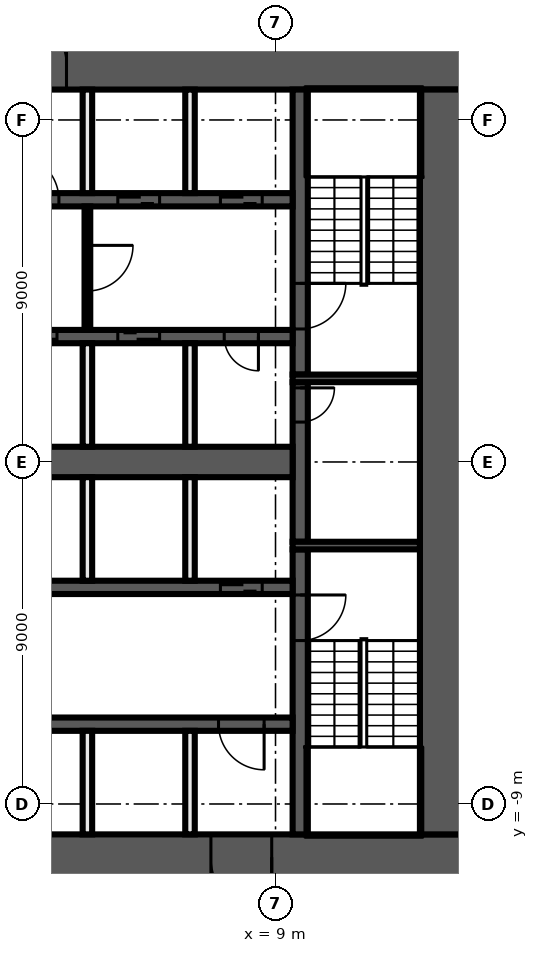
"""IFC4 building model, lengths in metres.
Left out: names, types, materials, properties, quantities, classifications, styles, units other than length and angle.
Written with IfcOpenShell. Run it as: python <this file> out.ifc"""

import sys

from ifc_helpers import new_model, si_unit, direction, frame, frame_2d, origin, place, context, subcontext, project, spatial, rectangle, extrude, element, fill, save


model = new_model("IFC4")
c1 = context("Model", 3, precision=1e-05, world=origin(), true_north=direction((0.0, 1.0)))
c2 = subcontext(c1, "Body", "Model", "MODEL_VIEW")
j1 = project(units=[si_unit("LENGTHUNIT", "METRE"), si_unit("PLANEANGLEUNIT", "RADIAN")], contexts=[c1])
p1 = place(None, origin())
s1 = spatial("IfcSite", under=j1, at=p1, CompositionType="ELEMENT")
p2 = place(p1, origin())
s2 = spatial("IfcBuilding", under=s1, at=p2, CompositionType="ELEMENT")
p3 = place(p2, frame((0.0, 0.0, 73.6)))
s3 = spatial("IfcBuildingStorey", under=s2, at=p3, CompositionType="ELEMENT", Elevation=73.6)
p4 = place(p3, frame((-14.0, 10.4, 0.0), z_axis=(0.0, 0.0, 1.0), x_axis=(1.0, 0.0, 0.0)))
e1 = element("IfcWall", 1, at=p4, inside=s3, PredefinedType="SHEAR", context=c2, shape_type="SweptSolid", body=[
    extrude(rectangle(XDim=28.0, YDim=1.2, at=frame_2d((14.0, 0.0))), origin(), (0.0, 0.0, 1.0), 3.3),
])
p5 = place(p4, frame((15.9, 0.0, 0.0)))
e2 = element("IfcOpeningElement", 2, at=p5, cuts=e1, PredefinedType="OPENING", context=c2, shape_type="SweptSolid", body=[
    extrude(rectangle(XDim=1.6, YDim=2.1, at=frame_2d((0.8, 1.05))), frame((0.0, 0.61, 0.0), z_axis=(0.0, -1.0, 0.0), x_axis=(1.0, 0.0, 0.0)), (0.0, 0.0, 1.0), 1.22),
])
p6 = place(p3, frame((14.0, -10.4, 0.0), z_axis=(0.0, 0.0, 1.0), x_axis=(-1.0, 0.0, 0.0)))
e3 = element("IfcWall", 3, at=p6, inside=s3, PredefinedType="SHEAR", context=c2, shape_type="SweptSolid", body=[
    extrude(rectangle(XDim=28.0, YDim=1.2, at=frame_2d((14.0, 0.0))), origin(), (0.0, 0.0, 1.0), 3.3),
])
p7 = place(p6, frame((5.1, 0.0, 0.0)))
e4 = element("IfcOpeningElement", 4, at=p7, cuts=e3, PredefinedType="OPENING", context=c2, shape_type="SweptSolid", body=[
    extrude(rectangle(XDim=1.6, YDim=2.1, at=frame_2d((0.8, 1.05))), frame((0.0, 0.61, 0.0), z_axis=(0.0, -1.0, 0.0), x_axis=(1.0, 0.0, 0.0)), (0.0, 0.0, 1.0), 1.22),
])
p8 = place(p3, frame((13.4, 9.8, 0.0), z_axis=(0.0, 0.0, 1.0), x_axis=(0.0, -1.0, 0.0)))
e5 = element("IfcWall", 5, at=p8, inside=s3, PredefinedType="SHEAR", context=c2, shape_type="SweptSolid", body=[
    extrude(rectangle(XDim=19.6, YDim=1.2, at=frame_2d((9.8, 0.0))), origin(), (0.0, 0.0, 1.0), 3.3),
])
p9 = place(p3, frame((9.65, -2.3, 0.0), z_axis=(0.0, 0.0, 1.0), x_axis=(0.0, -1.0, 0.0)))
e6 = element("IfcWall", 6, at=p9, inside=s3, PredefinedType="SHEAR", context=c2, shape_type="SweptSolid", body=[
    extrude(rectangle(XDim=7.5, YDim=0.4, at=frame_2d((3.75, 0.0))), origin(), (0.0, 0.0, 1.0), 3.3),
])
p10 = place(p9, frame((1.2, 0.0, 0.0)))
e7 = element("IfcOpeningElement", 7, at=p10, cuts=e6, PredefinedType="OPENING", context=c2, shape_type="SweptSolid", body=[
    extrude(rectangle(XDim=1.2, YDim=2.1, at=frame_2d((0.6, 1.05))), frame((0.0, 0.21, 0.0), z_axis=(0.0, -1.0, 0.0), x_axis=(1.0, 0.0, 0.0)), (0.0, 0.0, 1.0), 0.42),
])
p11 = place(p3, frame((9.65, 2.1, 0.0), z_axis=(0.0, 0.0, 1.0), x_axis=(0.0, -1.0, 0.0)))
e8 = element("IfcWall", 8, at=p11, inside=s3, PredefinedType="SHEAR", context=c2, shape_type="SweptSolid", body=[
    extrude(rectangle(XDim=4.2, YDim=0.4, at=frame_2d((2.1, 0.0))), origin(), (0.0, 0.0, 1.0), 3.3),
])
p12 = place(p11, frame((0.15, 0.0, 0.0)))
e9 = element("IfcOpeningElement", 9, at=p12, cuts=e8, PredefinedType="OPENING", context=c2, shape_type="SweptSolid", body=[
    extrude(rectangle(XDim=0.9, YDim=2.1, at=frame_2d((0.45, 1.05))), frame((0.0, 0.21, 0.0), z_axis=(0.0, -1.0, 0.0), x_axis=(1.0, 0.0, 0.0)), (0.0, 0.0, 1.0), 0.42),
])
p13 = place(p3, frame((9.65, 9.8, 0.0), z_axis=(0.0, 0.0, 1.0), x_axis=(0.0, -1.0, 0.0)))
e10 = element("IfcWall", 10, at=p13, inside=s3, PredefinedType="SHEAR", context=c2, shape_type="SweptSolid", body=[
    extrude(rectangle(XDim=7.5, YDim=0.4, at=frame_2d((3.75, 0.0))), origin(), (0.0, 0.0, 1.0), 3.3),
])
p14 = place(p13, frame((5.1, 0.0, 0.0)))
e11 = element("IfcOpeningElement", 11, at=p14, cuts=e10, PredefinedType="OPENING", context=c2, shape_type="SweptSolid", body=[
    extrude(rectangle(XDim=1.2, YDim=2.1, at=frame_2d((0.6, 1.05))), frame((0.0, 0.21, 0.0), z_axis=(0.0, -1.0, 0.0), x_axis=(1.0, 0.0, 0.0)), (0.0, 0.0, 1.0), 0.42),
])
for number, where, z_axis, x_axis in (
    (12, (9.45, 2.2, 0.0), (0.0, 0.0, 1.0), (1.0, 0.0, 0.0)),
    (13, (9.45, -2.2, 0.0), (0.0, 0.0, 1.0), (1.0, 0.0, 0.0)),
):
    element("IfcWall", number, at=place(p3, frame(where, z_axis=z_axis, x_axis=x_axis)), inside=s3, PredefinedType="SHEAR", context=c2, shape_type="SweptSolid", body=[
        extrude(rectangle(XDim=3.35, YDim=0.2, at=frame_2d((1.675, 0.0))), origin(), (0.0, 0.0, 1.0), 3.3),
    ])
p15 = place(p3, frame((-9.45, 6.9, 0.0), z_axis=(0.0, 0.0, 1.0), x_axis=(1.0, 0.0, 0.0)))
e14 = element("IfcWall", 14, at=p15, inside=s3, PredefinedType="SHEAR", context=c2, shape_type="SweptSolid", body=[
    extrude(rectangle(XDim=18.9, YDim=0.35, at=frame_2d((9.45, 0.0))), origin(), (0.0, 0.0, 1.0), 3.3),
])
p16 = place(p15, frame((0.8, 0.0, 0.0)))
e15 = element("IfcOpeningElement", 15, at=p16, cuts=e14, PredefinedType="OPENING", context=c2, shape_type="SweptSolid", body=[
    extrude(rectangle(XDim=1.1, YDim=2.1, at=frame_2d((0.55, 1.05))), frame((0.0, 0.185, 0.0), z_axis=(0.0, -1.0, 0.0), x_axis=(1.0, 0.0, 0.0)), (0.0, 0.0, 1.0), 0.37),
])
p17 = place(p15, frame((3.5, 0.0, 0.0)))
e16 = element("IfcOpeningElement", 16, at=p17, cuts=e14, PredefinedType="OPENING", context=c2, shape_type="SweptSolid", body=[
    extrude(rectangle(XDim=1.1, YDim=2.1, at=frame_2d((0.55, 1.05))), frame((0.0, 0.185, 0.0), z_axis=(0.0, -1.0, 0.0), x_axis=(1.0, 0.0, 0.0)), (0.0, 0.0, 1.0), 0.37),
])
p18 = place(p15, frame((6.2, 0.0, 0.0)))
e17 = element("IfcOpeningElement", 17, at=p18, cuts=e14, PredefinedType="OPENING", context=c2, shape_type="SweptSolid", body=[
    extrude(rectangle(XDim=1.1, YDim=2.1, at=frame_2d((0.55, 1.05))), frame((0.0, 0.185, 0.0), z_axis=(0.0, -1.0, 0.0), x_axis=(1.0, 0.0, 0.0)), (0.0, 0.0, 1.0), 0.37),
])
p19 = place(p15, frame((8.9, 0.0, 0.0)))
e18 = element("IfcOpeningElement", 18, at=p19, cuts=e14, PredefinedType="OPENING", context=c2, shape_type="SweptSolid", body=[
    extrude(rectangle(XDim=1.1, YDim=2.1, at=frame_2d((0.55, 1.05))), frame((0.0, 0.185, 0.0), z_axis=(0.0, -1.0, 0.0), x_axis=(1.0, 0.0, 0.0)), (0.0, 0.0, 1.0), 0.37),
])
p20 = place(p15, frame((11.55, 0.0, 0.0)))
e19 = element("IfcOpeningElement", 19, at=p20, cuts=e14, PredefinedType="OPENING", context=c2, shape_type="SweptSolid", body=[
    extrude(rectangle(XDim=1.2, YDim=2.1, at=frame_2d((0.6, 1.05))), frame((0.0, 0.185, 0.0), z_axis=(0.0, -1.0, 0.0), x_axis=(1.0, 0.0, 0.0)), (0.0, 0.0, 1.0), 0.37),
])
p21 = place(p15, frame((14.3, 0.0, 0.0)))
e20 = element("IfcOpeningElement", 20, at=p21, cuts=e14, PredefinedType="OPENING", context=c2, shape_type="SweptSolid", body=[
    extrude(rectangle(XDim=1.1, YDim=2.1, at=frame_2d((0.55, 1.05))), frame((0.0, 0.185, 0.0), z_axis=(0.0, -1.0, 0.0), x_axis=(1.0, 0.0, 0.0)), (0.0, 0.0, 1.0), 0.37),
])
p22 = place(p15, frame((17.0, 0.0, 0.0)))
e21 = element("IfcOpeningElement", 21, at=p22, cuts=e14, PredefinedType="OPENING", context=c2, shape_type="SweptSolid", body=[
    extrude(rectangle(XDim=1.1, YDim=2.1, at=frame_2d((0.55, 1.05))), frame((0.0, 0.185, 0.0), z_axis=(0.0, -1.0, 0.0), x_axis=(1.0, 0.0, 0.0)), (0.0, 0.0, 1.0), 0.37),
])
p23 = place(p3, frame((9.45, 3.3, 0.0), z_axis=(0.0, 0.0, 1.0), x_axis=(-1.0, 0.0, 0.0)))
e22 = element("IfcWall", 22, at=p23, inside=s3, PredefinedType="SHEAR", context=c2, shape_type="SweptSolid", body=[
    extrude(rectangle(XDim=18.9, YDim=0.35, at=frame_2d((9.45, 0.0))), origin(), (0.0, 0.0, 1.0), 3.3),
])
p24 = place(p23, frame((17.0, 0.0, 0.0)))
e23 = element("IfcOpeningElement", 23, at=p24, cuts=e22, PredefinedType="OPENING", context=c2, shape_type="SweptSolid", body=[
    extrude(rectangle(XDim=1.1, YDim=2.1, at=frame_2d((0.55, 1.05))), frame((0.0, 0.185, 0.0), z_axis=(0.0, -1.0, 0.0), x_axis=(1.0, 0.0, 0.0)), (0.0, 0.0, 1.0), 0.37),
])
p25 = place(p23, frame((14.3, 0.0, 0.0)))
e24 = element("IfcOpeningElement", 24, at=p25, cuts=e22, PredefinedType="OPENING", context=c2, shape_type="SweptSolid", body=[
    extrude(rectangle(XDim=1.1, YDim=2.1, at=frame_2d((0.55, 1.05))), frame((0.0, 0.185, 0.0), z_axis=(0.0, -1.0, 0.0), x_axis=(1.0, 0.0, 0.0)), (0.0, 0.0, 1.0), 0.37),
])
p26 = place(p23, frame((11.6, 0.0, 0.0)))
e25 = element("IfcOpeningElement", 25, at=p26, cuts=e22, PredefinedType="OPENING", context=c2, shape_type="SweptSolid", body=[
    extrude(rectangle(XDim=1.1, YDim=2.1, at=frame_2d((0.55, 1.05))), frame((0.0, 0.185, 0.0), z_axis=(0.0, -1.0, 0.0), x_axis=(1.0, 0.0, 0.0)), (0.0, 0.0, 1.0), 0.37),
])
p27 = place(p23, frame((8.9, 0.0, 0.0)))
e26 = element("IfcOpeningElement", 26, at=p27, cuts=e22, PredefinedType="OPENING", context=c2, shape_type="SweptSolid", body=[
    extrude(rectangle(XDim=1.1, YDim=2.1, at=frame_2d((0.55, 1.05))), frame((0.0, 0.185, 0.0), z_axis=(0.0, -1.0, 0.0), x_axis=(1.0, 0.0, 0.0)), (0.0, 0.0, 1.0), 0.37),
])
p28 = place(p23, frame((6.2, 0.0, 0.0)))
e27 = element("IfcOpeningElement", 27, at=p28, cuts=e22, PredefinedType="OPENING", context=c2, shape_type="SweptSolid", body=[
    extrude(rectangle(XDim=1.1, YDim=2.1, at=frame_2d((0.55, 1.05))), frame((0.0, 0.185, 0.0), z_axis=(0.0, -1.0, 0.0), x_axis=(1.0, 0.0, 0.0)), (0.0, 0.0, 1.0), 0.37),
])
p29 = place(p23, frame((3.5, 0.0, 0.0)))
e28 = element("IfcOpeningElement", 28, at=p29, cuts=e22, PredefinedType="OPENING", context=c2, shape_type="SweptSolid", body=[
    extrude(rectangle(XDim=1.1, YDim=2.1, at=frame_2d((0.55, 1.05))), frame((0.0, 0.185, 0.0), z_axis=(0.0, -1.0, 0.0), x_axis=(1.0, 0.0, 0.0)), (0.0, 0.0, 1.0), 0.37),
])
p30 = place(p23, frame((0.9, 0.0, 0.0)))
e29 = element("IfcOpeningElement", 29, at=p30, cuts=e22, PredefinedType="OPENING", context=c2, shape_type="SweptSolid", body=[
    extrude(rectangle(XDim=0.9, YDim=2.1, at=frame_2d((0.45, 1.05))), frame((0.0, 0.185, 0.0), z_axis=(0.0, -1.0, 0.0), x_axis=(1.0, 0.0, 0.0)), (0.0, 0.0, 1.0), 0.37),
])
p31 = place(p3, frame((-9.45, -3.3, 0.0), z_axis=(0.0, 0.0, 1.0), x_axis=(1.0, 0.0, 0.0)))
e30 = element("IfcWall", 30, at=p31, inside=s3, PredefinedType="SHEAR", context=c2, shape_type="SweptSolid", body=[
    extrude(rectangle(XDim=18.9, YDim=0.35, at=frame_2d((9.45, 0.0))), origin(), (0.0, 0.0, 1.0), 3.3),
])
p32 = place(p31, frame((17.0, 0.0, 0.0)))
e31 = element("IfcOpeningElement", 31, at=p32, cuts=e30, PredefinedType="OPENING", context=c2, shape_type="SweptSolid", body=[
    extrude(rectangle(XDim=1.1, YDim=2.1, at=frame_2d((0.55, 1.05))), frame((0.0, 0.185, 0.0), z_axis=(0.0, -1.0, 0.0), x_axis=(1.0, 0.0, 0.0)), (0.0, 0.0, 1.0), 0.37),
])
p33 = place(p31, frame((0.9, 0.0, 0.0)))
e32 = element("IfcOpeningElement", 32, at=p33, cuts=e30, PredefinedType="OPENING", context=c2, shape_type="SweptSolid", body=[
    extrude(rectangle(XDim=0.9, YDim=2.1, at=frame_2d((0.45, 1.05))), frame((0.0, 0.185, 0.0), z_axis=(0.0, -1.0, 0.0), x_axis=(1.0, 0.0, 0.0)), (0.0, 0.0, 1.0), 0.37),
])
p34 = place(p31, frame((3.6, 0.0, 0.0)))
e33 = element("IfcOpeningElement", 33, at=p34, cuts=e30, PredefinedType="OPENING", context=c2, shape_type="SweptSolid", body=[
    extrude(rectangle(XDim=0.9, YDim=2.1, at=frame_2d((0.45, 1.05))), frame((0.0, 0.185, 0.0), z_axis=(0.0, -1.0, 0.0), x_axis=(1.0, 0.0, 0.0)), (0.0, 0.0, 1.0), 0.37),
])
p35 = place(p31, frame((6.3, 0.0, 0.0)))
e34 = element("IfcOpeningElement", 34, at=p35, cuts=e30, PredefinedType="OPENING", context=c2, shape_type="SweptSolid", body=[
    extrude(rectangle(XDim=0.9, YDim=2.1, at=frame_2d((0.45, 1.05))), frame((0.0, 0.185, 0.0), z_axis=(0.0, -1.0, 0.0), x_axis=(1.0, 0.0, 0.0)), (0.0, 0.0, 1.0), 0.37),
])
p36 = place(p31, frame((9.0, 0.0, 0.0)))
e35 = element("IfcOpeningElement", 35, at=p36, cuts=e30, PredefinedType="OPENING", context=c2, shape_type="SweptSolid", body=[
    extrude(rectangle(XDim=0.9, YDim=2.1, at=frame_2d((0.45, 1.05))), frame((0.0, 0.185, 0.0), z_axis=(0.0, -1.0, 0.0), x_axis=(1.0, 0.0, 0.0)), (0.0, 0.0, 1.0), 0.37),
])
p37 = place(p3, frame((9.45, -6.9, 0.0), z_axis=(0.0, 0.0, 1.0), x_axis=(-1.0, 0.0, 0.0)))
e36 = element("IfcWall", 36, at=p37, inside=s3, PredefinedType="SHEAR", context=c2, shape_type="SweptSolid", body=[
    extrude(rectangle(XDim=18.9, YDim=0.35, at=frame_2d((9.45, 0.0))), origin(), (0.0, 0.0, 1.0), 3.3),
])
p38 = place(p37, frame((0.75, 0.0, 0.0)))
e37 = element("IfcOpeningElement", 37, at=p38, cuts=e36, PredefinedType="OPENING", context=c2, shape_type="SweptSolid", body=[
    extrude(rectangle(XDim=1.2, YDim=2.1, at=frame_2d((0.6, 1.05))), frame((0.0, 0.185, 0.0), z_axis=(0.0, -1.0, 0.0), x_axis=(1.0, 0.0, 0.0)), (0.0, 0.0, 1.0), 0.37),
])
p39 = place(p37, frame((15.75, 0.0, 0.0)))
e38 = element("IfcOpeningElement", 38, at=p39, cuts=e36, PredefinedType="OPENING", context=c2, shape_type="SweptSolid", body=[
    extrude(rectangle(XDim=0.9, YDim=2.1, at=frame_2d((0.45, 1.05))), frame((0.0, 0.185, 0.0), z_axis=(0.0, -1.0, 0.0), x_axis=(1.0, 0.0, 0.0)), (0.0, 0.0, 1.0), 0.37),
])
p40 = place(p37, frame((10.35, 0.0, 0.0)))
e39 = element("IfcOpeningElement", 39, at=p40, cuts=e36, PredefinedType="OPENING", context=c2, shape_type="SweptSolid", body=[
    extrude(rectangle(XDim=0.9, YDim=2.1, at=frame_2d((0.45, 1.05))), frame((0.0, 0.185, 0.0), z_axis=(0.0, -1.0, 0.0), x_axis=(1.0, 0.0, 0.0)), (0.0, 0.0, 1.0), 0.37),
])
p41 = place(p3, frame((-9.45, 0.0, 0.0), z_axis=(0.0, 0.0, 1.0), x_axis=(1.0, 0.0, 0.0)))
e40 = element("IfcWall", 40, at=p41, inside=s3, PredefinedType="SHEAR", context=c2, shape_type="SweptSolid", body=[
    extrude(rectangle(XDim=18.9, YDim=0.8, at=frame_2d((9.45, 0.0))), origin(), (0.0, 0.0, 1.0), 3.3),
])
for number, where, z_axis, x_axis in (
    (41, (6.75, -9.8, 0.0), (0.0, 0.0, 1.0), (0.0, 1.0, 0.0)),
    (42, (6.75, -3.125, 0.0), (0.0, 0.0, 1.0), (0.0, 1.0, 0.0)),
    (43, (6.75, 0.4, 0.0), (0.0, 0.0, 1.0), (0.0, 1.0, 0.0)),
    (44, (6.75, 7.075, 0.0), (0.0, 0.0, 1.0), (0.0, 1.0, 0.0)),
):
    element("IfcWall", number, at=place(p3, frame(where, z_axis=z_axis, x_axis=x_axis)), inside=s3, PredefinedType="SOLIDWALL", context=c2, shape_type="SweptSolid", body=[
        extrude(rectangle(XDim=2.725, YDim=0.25, at=frame_2d((1.363, 0.0))), origin(), (0.0, 0.0, 1.0), 3.3),
    ])
p42 = place(p3, frame((4.05, 6.725, 0.0), z_axis=(0.0, 0.0, 1.0), x_axis=(0.0, -1.0, 0.0)))
e45 = element("IfcWall", 45, at=p42, inside=s3, PredefinedType="PARTITIONING", context=c2, shape_type="SweptSolid", body=[
    extrude(rectangle(XDim=3.25, YDim=0.15, at=frame_2d((1.625, 0.0))), origin(), (0.0, 0.0, 1.0), 3.3),
])
p43 = place(p42, frame((1.025, 0.0, 0.0)))
e46 = element("IfcOpeningElement", 46, at=p43, cuts=e45, PredefinedType="OPENING", context=c2, shape_type="SweptSolid", body=[
    extrude(rectangle(XDim=1.2, YDim=2.1, at=frame_2d((0.6, 1.05))), frame((0.0, 0.085, 0.0), z_axis=(0.0, -1.0, 0.0), x_axis=(1.0, 0.0, 0.0)), (0.0, 0.0, 1.0), 0.17),
])
for number, where, z_axis, x_axis in (
    (47, (4.05, -9.8, 0.0), (0.0, 0.0, 1.0), (0.0, 1.0, 0.0)),
    (48, (4.05, -3.125, 0.0), (0.0, 0.0, 1.0), (0.0, 1.0, 0.0)),
    (49, (4.05, 0.4, 0.0), (0.0, 0.0, 1.0), (0.0, 1.0, 0.0)),
    (50, (4.05, 7.075, 0.0), (0.0, 0.0, 1.0), (0.0, 1.0, 0.0)),
):
    element("IfcWall", number, at=place(p3, frame(where, z_axis=z_axis, x_axis=x_axis)), inside=s3, PredefinedType="SOLIDWALL", context=c2, shape_type="SweptSolid", body=[
        extrude(rectangle(XDim=2.725, YDim=0.25, at=frame_2d((1.363, 0.0))), origin(), (0.0, 0.0, 1.0), 3.3),
    ])
p44 = place(p12, origin())
e51 = element("IfcDoor", 51, at=p44, inside=s3, OperationType="SINGLE_SWING_RIGHT", PredefinedType="DOOR", context=c2, shape_type="SweptSolid", body=[
    extrude(rectangle(XDim=0.9, YDim=2.1, at=frame_2d((0.45, 1.05))), frame((0.0, 0.025, 0.0), z_axis=(0.0, -1.0, 0.0), x_axis=(1.0, 0.0, 0.0)), (0.0, 0.0, 1.0), 0.05),
])
fill(e9, e51)
p45 = place(p5, origin())
e52 = element("IfcDoor", 52, at=p45, inside=s3, OperationType="DOUBLE_DOOR_SINGLE_SWING", PredefinedType="DOOR", context=c2, shape_type="SweptSolid", body=[
    extrude(rectangle(XDim=1.6, YDim=2.1, at=frame_2d((0.8, 1.05))), frame((0.0, 0.025, 0.0), z_axis=(0.0, -1.0, 0.0), x_axis=(1.0, 0.0, 0.0)), (0.0, 0.0, 1.0), 0.05),
])
fill(e2, e52)
p46 = place(p20, origin())
e53 = element("IfcDoor", 53, at=p46, inside=s3, OperationType="SINGLE_SWING_LEFT", PredefinedType="DOOR", context=c2, shape_type="SweptSolid", body=[
    extrude(rectangle(XDim=1.2, YDim=2.1, at=frame_2d((0.6, 1.05))), frame((0.0, 0.025, 0.0), z_axis=(0.0, -1.0, 0.0), x_axis=(1.0, 0.0, 0.0)), (0.0, 0.0, 1.0), 0.05),
])
fill(e19, e53)
p47 = place(p21, origin())
e54 = element("IfcDoor", 54, at=p47, inside=s3, OperationType="DOUBLE_DOOR_SLIDING", PredefinedType="DOOR", context=c2, shape_type="SweptSolid", body=[
    extrude(rectangle(XDim=1.1, YDim=2.1, at=frame_2d((0.55, 1.05))), frame((0.0, 0.025, 0.0), z_axis=(0.0, -1.0, 0.0), x_axis=(1.0, 0.0, 0.0)), (0.0, 0.0, 1.0), 0.05),
])
fill(e20, e54)
p48 = place(p22, origin())
e55 = element("IfcDoor", 55, at=p48, inside=s3, OperationType="DOUBLE_DOOR_SLIDING", PredefinedType="DOOR", context=c2, shape_type="SweptSolid", body=[
    extrude(rectangle(XDim=1.1, YDim=2.1, at=frame_2d((0.55, 1.05))), frame((0.0, 0.025, 0.0), z_axis=(0.0, -1.0, 0.0), x_axis=(1.0, 0.0, 0.0)), (0.0, 0.0, 1.0), 0.05),
])
fill(e21, e55)
p49 = place(p28, origin())
e56 = element("IfcDoor", 56, at=p49, inside=s3, OperationType="DOUBLE_DOOR_SLIDING", PredefinedType="DOOR", context=c2, shape_type="SweptSolid", body=[
    extrude(rectangle(XDim=1.1, YDim=2.1, at=frame_2d((0.55, 1.05))), frame((0.0, 0.025, 0.0), z_axis=(0.0, -1.0, 0.0), x_axis=(1.0, 0.0, 0.0)), (0.0, 0.0, 1.0), 0.05),
])
fill(e27, e56)
p50 = place(p29, origin())
e57 = element("IfcDoor", 57, at=p50, inside=s3, OperationType="DOUBLE_DOOR_SLIDING", PredefinedType="DOOR", context=c2, shape_type="SweptSolid", body=[
    extrude(rectangle(XDim=1.1, YDim=2.1, at=frame_2d((0.55, 1.05))), frame((0.0, 0.025, 0.0), z_axis=(0.0, -1.0, 0.0), x_axis=(1.0, 0.0, 0.0)), (0.0, 0.0, 1.0), 0.05),
])
fill(e28, e57)
p51 = place(p30, origin())
e58 = element("IfcDoor", 58, at=p51, inside=s3, OperationType="SINGLE_SWING_LEFT", PredefinedType="DOOR", context=c2, shape_type="SweptSolid", body=[
    extrude(rectangle(XDim=0.9, YDim=2.1, at=frame_2d((0.45, 1.05))), frame((0.0, 0.025, 0.0), z_axis=(0.0, -1.0, 0.0), x_axis=(1.0, 0.0, 0.0)), (0.0, 0.0, 1.0), 0.05),
])
fill(e29, e58)
p52 = place(p32, origin())
e59 = element("IfcDoor", 59, at=p52, inside=s3, OperationType="DOUBLE_DOOR_SLIDING", PredefinedType="DOOR", context=c2, shape_type="SweptSolid", body=[
    extrude(rectangle(XDim=1.1, YDim=2.1, at=frame_2d((0.55, 1.05))), frame((0.0, 0.025, 0.0), z_axis=(0.0, -1.0, 0.0), x_axis=(1.0, 0.0, 0.0)), (0.0, 0.0, 1.0), 0.05),
])
fill(e31, e59)
p53 = place(p7, origin())
e60 = element("IfcDoor", 60, at=p53, inside=s3, OperationType="DOUBLE_DOOR_SINGLE_SWING", PredefinedType="DOOR", context=c2, shape_type="SweptSolid", body=[
    extrude(rectangle(XDim=1.6, YDim=2.1, at=frame_2d((0.8, 1.05))), frame((0.0, 0.025, 0.0), z_axis=(0.0, -1.0, 0.0), x_axis=(1.0, 0.0, 0.0)), (0.0, 0.0, 1.0), 0.05),
])
fill(e4, e60)
p54 = place(p38, origin())
e61 = element("IfcDoor", 61, at=p54, inside=s3, OperationType="SINGLE_SWING_LEFT", PredefinedType="DOOR", context=c2, shape_type="SweptSolid", body=[
    extrude(rectangle(XDim=1.2, YDim=2.1, at=frame_2d((0.6, 1.05))), frame((0.0, 0.025, 0.0), z_axis=(0.0, -1.0, 0.0), x_axis=(1.0, 0.0, 0.0)), (0.0, 0.0, 1.0), 0.05),
])
fill(e37, e61)
p55 = place(p14, origin())
e62 = element("IfcDoor", 62, at=p55, inside=s3, OperationType="SINGLE_SWING_LEFT", PredefinedType="DOOR", context=c2, shape_type="SweptSolid", body=[
    extrude(rectangle(XDim=1.2, YDim=2.1, at=frame_2d((0.6, 1.05))), frame((0.0, 0.025, 0.0), z_axis=(0.0, -1.0, 0.0), x_axis=(1.0, 0.0, 0.0)), (0.0, 0.0, 1.0), 0.05),
])
fill(e11, e62)
p56 = place(p10, origin())
e63 = element("IfcDoor", 63, at=p56, inside=s3, OperationType="SINGLE_SWING_RIGHT", PredefinedType="DOOR", context=c2, shape_type="SweptSolid", body=[
    extrude(rectangle(XDim=1.2, YDim=2.1, at=frame_2d((0.6, 1.05))), frame((0.0, 0.025, 0.0), z_axis=(0.0, -1.0, 0.0), x_axis=(1.0, 0.0, 0.0)), (0.0, 0.0, 1.0), 0.05),
])
fill(e7, e63)
p57 = place(p43, origin())
e64 = element("IfcDoor", 64, at=p57, inside=s3, OperationType="SINGLE_SWING_RIGHT", PredefinedType="DOOR", context=c2, shape_type="SweptSolid", body=[
    extrude(rectangle(XDim=1.2, YDim=2.1, at=frame_2d((0.6, 1.05))), frame((0.0, 0.025, 0.0), z_axis=(0.0, -1.0, 0.0), x_axis=(1.0, 0.0, 0.0)), (0.0, 0.0, 1.0), 0.05),
])
fill(e46, e64)
save(model, sys.argv[1])
